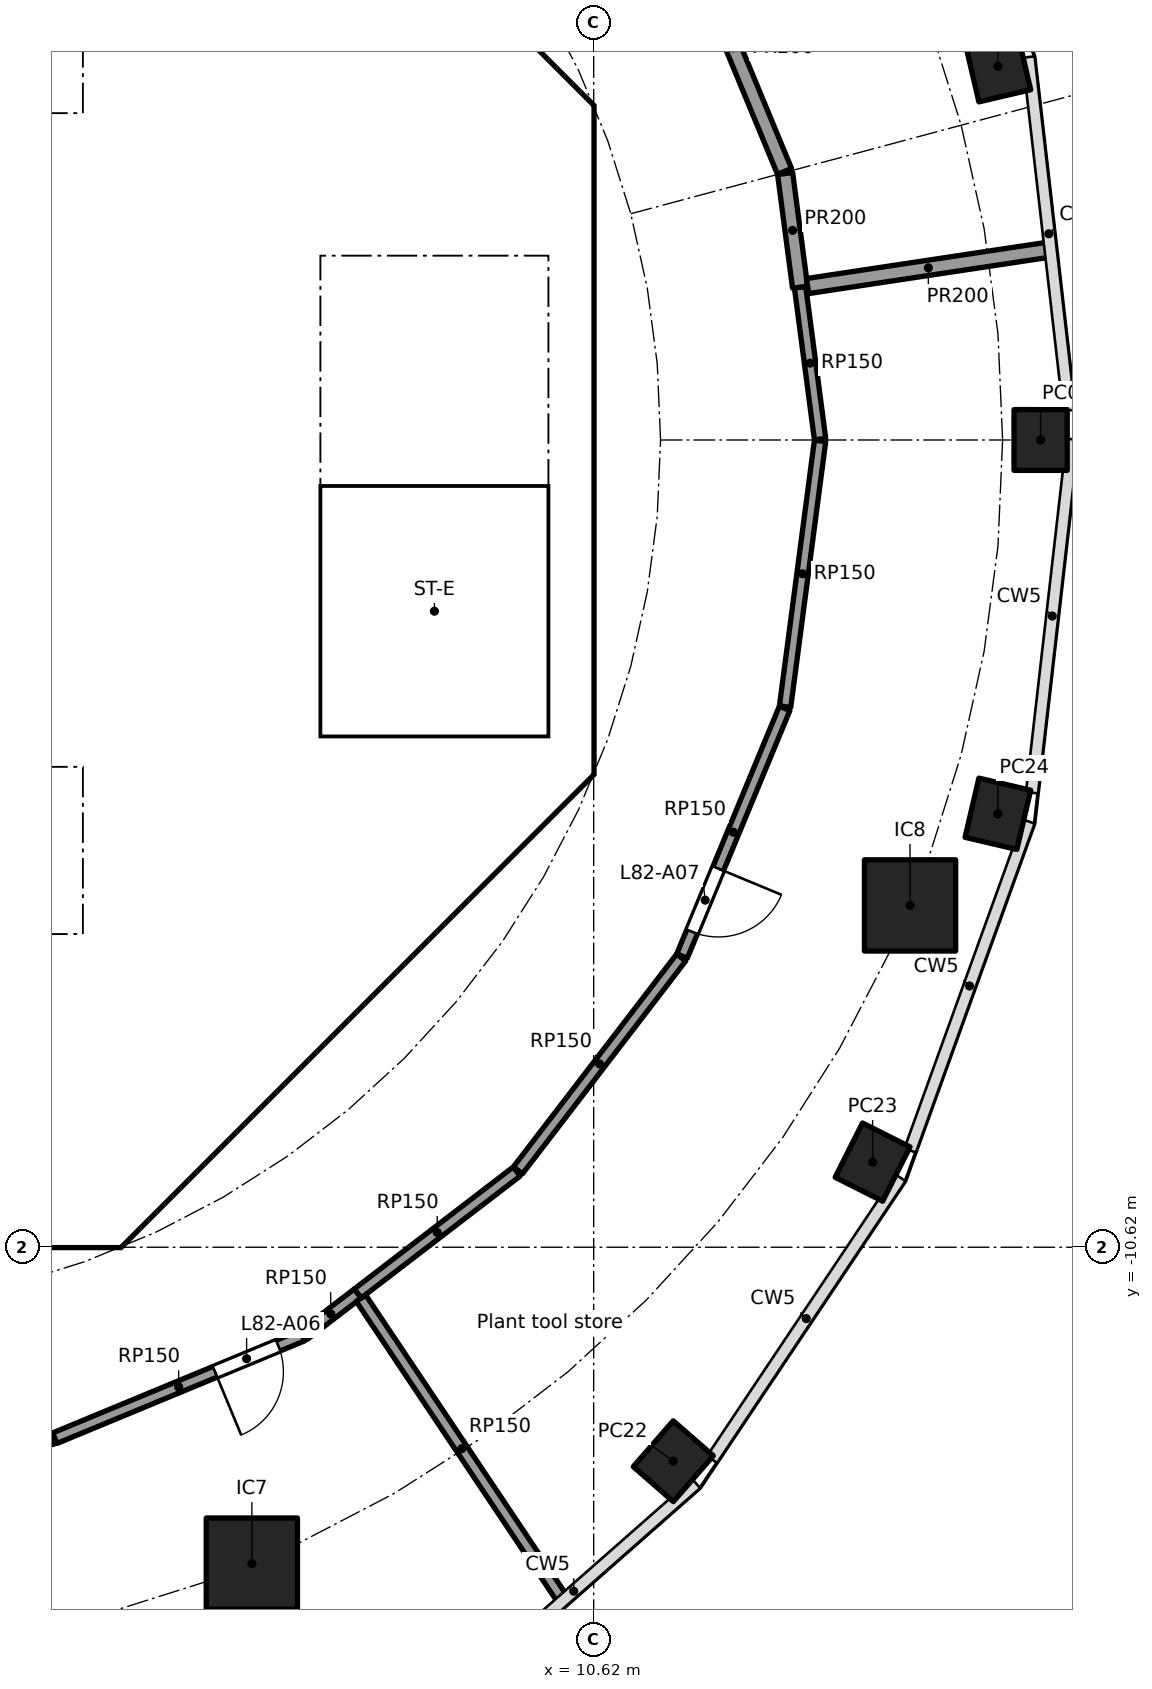
"""IFC4 building model, lengths in metres.
Left out: names, types, materials, properties, quantities, classifications, styles, units other than length and angle.
Written with IfcOpenShell. Run it as: python <this file> out.ifc"""

import sys

from ifc_helpers import new_model, si_unit, direction, frame, frame_2d, origin, origin_2d, place, context, subcontext, project, spatial, polyline, rectangle, hollow_rectangle, outline, extrude, element, fill, save


model = new_model("IFC4")
c1 = context("Model", 3, precision=1e-05, world=origin(), true_north=direction((0.0, 1.0)))
c2 = subcontext(c1, "Body", "Model", "MODEL_VIEW")
j1 = project(units=[si_unit("LENGTHUNIT", "METRE"), si_unit("PLANEANGLEUNIT", "RADIAN")], contexts=[c1])
p1 = place(None, origin())
s1 = spatial("IfcSite", under=j1, at=p1, CompositionType="ELEMENT")
p2 = place(p1, origin())
s2 = spatial("IfcBuilding", under=s1, at=p2, CompositionType="ELEMENT")
p3 = place(p2, frame((0.0, 0.0, 332.9)))
s3 = spatial("IfcBuildingStorey", under=s2, at=p3, CompositionType="ELEMENT", Elevation=332.9)
for number, where, z_axis, x_axis in (
    (1, (16.5, 0.0, 0.0), (0.0, 0.0, 1.0), (0.0, 1.0, 0.0)),
    (2, (15.938, 4.917, 0.0), (0.0, 0.0, 1.0), (-0.227, 0.974, 0.0)),
    (3, (11.667, -13.435, 0.0), (0.0, 0.0, 1.0), (0.657, 0.754, 0.0)),
    (4, (14.289, -9.5, 0.0), (0.0, 0.0, 1.0), (0.45, 0.893, 0.0)),
    (5, (15.938, -4.917, 0.0), (0.0, 0.0, 1.0), (0.227, 0.974, 0.0)),
):
    element("IfcColumn", number, at=place(p3, frame(where, z_axis=z_axis, x_axis=x_axis)), inside=s3, PredefinedType="COLUMN", context=c2, shape_type="SweptSolid", body=[
        extrude(hollow_rectangle(XDim=0.8, YDim=0.7, WallThickness=0.025, at=origin_2d()), origin(), (0.0, 0.0, 1.0), 4.0),
    ])
for number, where, z_axis, x_axis in (
    (6, (6.123, -14.782, 0.0), (0.0, 0.0, 1.0), (1.0, 0.0, 0.0)),
    (7, (14.782, -6.123, 0.0), (0.0, 0.0, 1.0), (1.0, 0.0, 0.0)),
):
    element("IfcColumn", number, at=place(p3, frame(where, z_axis=z_axis, x_axis=x_axis)), inside=s3, PredefinedType="COLUMN", context=c2, shape_type="SweptSolid", body=[
        extrude(rectangle(XDim=1.2, YDim=1.2, at=origin_2d()), origin(), (0.0, 0.0, 1.0), 4.0),
    ])
p4 = place(p3, frame((9.988, 4.613, 0.0), z_axis=(0.0, 0.0, 1.0), x_axis=(-0.707106781187, 0.707106781187, 0.0)))
e8 = element("IfcWall", 8, at=p4, inside=s3, PredefinedType="SHEAR", context=c2, shape_type="SweptSolid", body=[
    extrude(rectangle(XDim=7.602, YDim=0.6, at=frame_2d((3.801, 0.0))), origin(), (0.0, 0.0, 1.0), 3.7),
])
p5 = place(p4, frame((3.201, 0.0, 0.0)))
e9 = element("IfcOpeningElement", 9, at=p5, cuts=e8, PredefinedType="OPENING", context=c2, shape_type="SweptSolid", body=[
    extrude(rectangle(XDim=1.2, YDim=2.1, at=frame_2d((0.6, 1.05))), frame((0.0, 0.31, 0.0), z_axis=(0.0, -1.0, 0.0), x_axis=(1.0, 0.0, 0.0)), (0.0, 0.0, 1.0), 0.62),
])
p6 = place(p3, frame((4.613, -9.988, 0.0), z_axis=(0.0, 0.0, 1.0), x_axis=(0.707106781187, 0.707106781187, 0.0)))
e10 = element("IfcWall", 10, at=p6, inside=s3, PredefinedType="SHEAR", context=c2, shape_type="SweptSolid", body=[
    extrude(rectangle(XDim=7.602, YDim=0.6, at=frame_2d((3.801, 0.0))), origin(), (0.0, 0.0, 1.0), 3.7),
])
p7 = place(p6, frame((3.201, 0.0, 0.0)))
e11 = element("IfcOpeningElement", 11, at=p7, cuts=e10, PredefinedType="OPENING", context=c2, shape_type="SweptSolid", body=[
    extrude(rectangle(XDim=1.2, YDim=2.1, at=frame_2d((0.6, 1.05))), frame((0.0, 0.31, 0.0), z_axis=(0.0, -1.0, 0.0), x_axis=(1.0, 0.0, 0.0)), (0.0, 0.0, 1.0), 0.62),
])
p8 = place(p3, frame((4.0, 4.3, 0.0), z_axis=(0.0, 0.0, 1.0), x_axis=(0.0, 1.0, 0.0)))
e12 = element("IfcWall", 12, at=p8, inside=s3, PredefinedType="SOLIDWALL", context=c2, shape_type="SweptSolid", body=[
    extrude(rectangle(XDim=2.2, YDim=0.2, at=frame_2d((1.1, 0.0))), origin(), (0.0, 0.0, 1.0), 3.7),
])
p9 = place(p8, frame((0.55, 0.0, 0.0)))
e13 = element("IfcOpeningElement", 13, at=p9, cuts=e12, PredefinedType="OPENING", context=c2, shape_type="SweptSolid", body=[
    extrude(rectangle(XDim=1.1, YDim=2.1, at=frame_2d((0.55, 1.05))), frame((0.0, 0.11, 0.0), z_axis=(0.0, -1.0, 0.0), x_axis=(1.0, 0.0, 0.0)), (0.0, 0.0, 1.0), 0.22),
])
p10 = place(p3, frame((-6.7, 2.0, 0.0), z_axis=(0.0, 0.0, 1.0), x_axis=(1.0, 0.0, 0.0)))
e14 = element("IfcWall", 14, at=p10, inside=s3, PredefinedType="SOLIDWALL", context=c2, shape_type="SweptSolid", body=[
    extrude(rectangle(XDim=13.4, YDim=0.2, at=frame_2d((6.7, 0.0))), origin(), (0.0, 0.0, 1.0), 3.7),
])
p11 = place(p10, frame((2.95, 0.0, 0.0)))
e15 = element("IfcOpeningElement", 15, at=p11, cuts=e14, PredefinedType="OPENING", context=c2, shape_type="SweptSolid", body=[
    extrude(rectangle(XDim=0.9, YDim=2.1, at=frame_2d((0.45, 1.05))), frame((0.0, 0.11, 0.0), z_axis=(0.0, -1.0, 0.0), x_axis=(1.0, 0.0, 0.0)), (0.0, 0.0, 1.0), 0.22),
])
p12 = place(p10, frame((8.45, 0.0, 0.0)))
e16 = element("IfcOpeningElement", 16, at=p12, cuts=e14, PredefinedType="OPENING", context=c2, shape_type="SweptSolid", body=[
    extrude(rectangle(XDim=0.9, YDim=2.1, at=frame_2d((0.45, 1.05))), frame((0.0, 0.11, 0.0), z_axis=(0.0, -1.0, 0.0), x_axis=(1.0, 0.0, 0.0)), (0.0, 0.0, 1.0), 0.22),
])
p13 = place(p10, frame((11.75, 0.0, 0.0)))
e17 = element("IfcOpeningElement", 17, at=p13, cuts=e14, PredefinedType="OPENING", context=c2, shape_type="SweptSolid", body=[
    extrude(rectangle(XDim=0.9, YDim=2.1, at=frame_2d((0.45, 1.05))), frame((0.0, 0.11, 0.0), z_axis=(0.0, -1.0, 0.0), x_axis=(1.0, 0.0, 0.0)), (0.0, 0.0, 1.0), 0.22),
])
p14 = place(p3, frame((6.7, 4.0, 0.0), z_axis=(0.0, 0.0, 1.0), x_axis=(1.0, 0.0, 0.0)))
e18 = element("IfcWall", 18, at=p14, inside=s3, PredefinedType="SOLIDWALL", context=c2, shape_type="SweptSolid", body=[
    extrude(rectangle(XDim=3.325, YDim=0.2, at=frame_2d((1.662, 0.0))), origin(), (0.0, 0.0, 1.0), 3.7),
])
p15 = place(p14, frame((1.25, 0.0, 0.0)))
e19 = element("IfcOpeningElement", 19, at=p15, cuts=e18, PredefinedType="OPENING", context=c2, shape_type="SweptSolid", body=[
    extrude(rectangle(XDim=1.1, YDim=2.1, at=frame_2d((0.55, 1.05))), frame((0.0, 0.11, 0.0), z_axis=(0.0, -1.0, 0.0), x_axis=(1.0, 0.0, 0.0)), (0.0, 0.0, 1.0), 0.22),
])
p16 = place(p3, frame((4.0, -10.025, 0.0), z_axis=(0.0, 0.0, 1.0), x_axis=(0.0, 1.0, 0.0)))
e20 = element("IfcWall", 20, at=p16, inside=s3, PredefinedType="SOLIDWALL", context=c2, shape_type="SweptSolid", body=[
    extrude(rectangle(XDim=3.0, YDim=0.2, at=frame_2d((1.5, 0.0))), origin(), (0.0, 0.0, 1.0), 3.7),
])
p17 = place(p16, frame((0.975, 0.0, 0.0)))
e21 = element("IfcOpeningElement", 21, at=p17, cuts=e20, PredefinedType="OPENING", context=c2, shape_type="SweptSolid", body=[
    extrude(rectangle(XDim=1.1, YDim=2.1, at=frame_2d((0.55, 1.05))), frame((0.0, 0.11, 0.0), z_axis=(0.0, -1.0, 0.0), x_axis=(1.0, 0.0, 0.0)), (0.0, 0.0, 1.0), 0.22),
])
p18 = place(p3, frame((4.0, -6.5, 0.0), z_axis=(0.0, 0.0, 1.0), x_axis=(0.0, 1.0, 0.0)))
e22 = element("IfcWall", 22, at=p18, inside=s3, PredefinedType="SOLIDWALL", context=c2, shape_type="SweptSolid", body=[
    extrude(rectangle(XDim=2.2, YDim=0.2, at=frame_2d((1.1, 0.0))), origin(), (0.0, 0.0, 1.0), 3.7),
])
p19 = place(p18, frame((0.55, 0.0, 0.0)))
e23 = element("IfcOpeningElement", 23, at=p19, cuts=e22, PredefinedType="OPENING", context=c2, shape_type="SweptSolid", body=[
    extrude(rectangle(XDim=1.1, YDim=2.1, at=frame_2d((0.55, 1.05))), frame((0.0, 0.11, 0.0), z_axis=(0.0, -1.0, 0.0), x_axis=(1.0, 0.0, 0.0)), (0.0, 0.0, 1.0), 0.22),
])
p20 = place(p3, frame((-6.7, -2.0, 0.0), z_axis=(0.0, 0.0, 1.0), x_axis=(1.0, 0.0, 0.0)))
e24 = element("IfcWall", 24, at=p20, inside=s3, PredefinedType="SOLIDWALL", context=c2, shape_type="SweptSolid", body=[
    extrude(rectangle(XDim=13.4, YDim=0.2, at=frame_2d((6.7, 0.0))), origin(), (0.0, 0.0, 1.0), 3.7),
])
p21 = place(p20, frame((1.85, 0.0, 0.0)))
e25 = element("IfcOpeningElement", 25, at=p21, cuts=e24, PredefinedType="OPENING", context=c2, shape_type="SweptSolid", body=[
    extrude(rectangle(XDim=0.9, YDim=2.1, at=frame_2d((0.45, 1.05))), frame((0.0, 0.11, 0.0), z_axis=(0.0, -1.0, 0.0), x_axis=(1.0, 0.0, 0.0)), (0.0, 0.0, 1.0), 0.22),
])
p22 = place(p20, frame((6.25, 0.0, 0.0)))
e26 = element("IfcOpeningElement", 26, at=p22, cuts=e24, PredefinedType="OPENING", context=c2, shape_type="SweptSolid", body=[
    extrude(rectangle(XDim=0.9, YDim=2.1, at=frame_2d((0.45, 1.05))), frame((0.0, 0.11, 0.0), z_axis=(0.0, -1.0, 0.0), x_axis=(1.0, 0.0, 0.0)), (0.0, 0.0, 1.0), 0.22),
])
p23 = place(p20, frame((10.65, 0.0, 0.0)))
e27 = element("IfcOpeningElement", 27, at=p23, cuts=e24, PredefinedType="OPENING", context=c2, shape_type="SweptSolid", body=[
    extrude(rectangle(XDim=0.9, YDim=2.1, at=frame_2d((0.45, 1.05))), frame((0.0, 0.11, 0.0), z_axis=(0.0, -1.0, 0.0), x_axis=(1.0, 0.0, 0.0)), (0.0, 0.0, 1.0), 0.22),
])
p24 = place(p3, origin())
e28 = element("IfcWall", 28, at=p24, inside=s3, PredefinedType="SHEAR", context=c2, shape_type="SweptSolid", body=[
    extrude(outline(polyline([(-4.152, -10.025), (4.152, -10.025), (4.401, -9.776), (4.825, -10.2), (4.401, -10.625), (-4.401, -10.625), (-4.825, -10.2), (-4.401, -9.776), (-4.152, -10.025)])), origin(), (0.0, 0.0, 1.0), 3.7),
])
p25 = place(p3, origin())
e29 = element("IfcWall", 29, at=p25, inside=s3, PredefinedType="SHEAR", context=c2, shape_type="SweptSolid", body=[
    extrude(outline(polyline([(9.776, -4.401), (10.025, -4.152), (10.025, -3.801), (10.025, 4.152), (9.776, 4.401), (10.2, 4.825), (10.625, 4.401), (10.625, -4.401), (10.2, -4.825), (9.776, -4.401)])), origin(), (0.0, 0.0, 1.0), 3.7),
])
p26 = place(p3, origin())
e30 = element("IfcWall", 30, at=p26, inside=s3, PredefinedType="SOLIDWALL", context=c2, shape_type="SweptSolid", body=[
    extrude(outline(polyline([(-6.7, -2.1), (-6.5, -2.1), (-6.5, -4.1), (-2.3, -4.1), (-2.3, -2.1), (-2.1, -2.1), (-2.1, -4.1), (2.1, -4.1), (2.1, -2.1), (2.3, -2.1), (2.3, -4.1), (6.5, -4.1), (6.5, -2.1), (6.7, -2.1), (6.7, -4.3), (-6.7, -4.3), (-6.7, -2.1)])), origin(), (0.0, 0.0, 1.0), 3.7),
])
p27 = place(p3, origin())
e31 = element("IfcWall", 31, at=p27, inside=s3, PredefinedType="SOLIDWALL", context=c2, shape_type="SweptSolid", body=[
    extrude(outline(polyline([(-6.7, 4.3), (6.7, 4.3), (6.7, 2.1), (6.5, 2.1), (6.5, 4.1), (4.5, 4.1), (4.5, 2.1), (4.3, 2.1), (4.3, 4.1), (0.1, 4.1), (0.1, 2.1), (-0.1, 2.1), (-0.1, 4.1), (-6.5, 4.1), (-6.5, 2.1), (-6.7, 2.1), (-6.7, 4.3)])), origin(), (0.0, 0.0, 1.0), 3.7),
])
p28 = place(p3, origin())
e32 = element("IfcWall", 32, at=p28, inside=s3, PredefinedType="SOLIDWALL", context=c2, shape_type="SweptSolid", body=[
    extrude(outline(polyline([(4.1, -7.025), (-4.1, -7.025), (-4.1, -6.5), (4.1, -6.5), (4.1, -7.025)])), origin(), (0.0, 0.0, 1.0), 3.7),
])
p29 = place(p3, origin())
e33 = element("IfcWall", 33, at=p29, inside=s3, PredefinedType="SOLIDWALL", context=c2, shape_type="SweptSolid", body=[
    extrude(outline(polyline([(7.025, -3.9), (6.7, -3.9), (6.7, 3.9), (7.025, 3.9), (7.025, -3.9)])), origin(), (0.0, 0.0, 1.0), 3.7),
])
p30 = place(p3, origin())
e34 = element("IfcWall", 34, at=p30, inside=s3, PredefinedType="SOLIDWALL", context=c2, shape_type="SweptSolid", body=[
    extrude(outline(polyline([(10.025, -4.1), (6.7, -4.1), (6.7, -3.9), (10.025, -3.9), (10.025, -4.1)])), origin(), (0.0, 0.0, 1.0), 3.7),
])
p31 = place(p3, frame((3.508, -13.138, 0.0), z_axis=(0.0, 0.0, 1.0), x_axis=(-0.991448403586, -0.130499283623, 0.0)))
e35 = element("IfcWall", 35, at=p31, inside=s3, PredefinedType="PARTITIONING", context=c2, shape_type="SweptSolid", body=[
    extrude(rectangle(XDim=3.527, YDim=0.15, at=frame_2d((1.763, 0.0))), origin(), (0.0, 0.0, 1.0), 3.7),
])
p32 = place(p3, frame((6.789, -11.782, 0.0), z_axis=(0.0, 0.0, 1.0), x_axis=(-0.923881838111, -0.382677866108, 0.0)))
e36 = element("IfcWall", 36, at=p32, inside=s3, PredefinedType="PARTITIONING", context=c2, shape_type="SweptSolid", body=[
    extrude(rectangle(XDim=3.527, YDim=0.15, at=frame_2d((1.763, 0.0))), origin(), (0.0, 0.0, 1.0), 3.7),
])
p33 = place(p32, frame((0.346, 0.0, 0.0)))
e37 = element("IfcOpeningElement", 37, at=p33, cuts=e36, PredefinedType="OPENING", context=c2, shape_type="SweptSolid", body=[
    extrude(rectangle(XDim=0.9, YDim=2.1, at=frame_2d((0.45, 1.05))), frame((0.0, 0.085, 0.0), z_axis=(0.0, -1.0, 0.0), x_axis=(1.0, 0.0, 0.0)), (0.0, 0.0, 1.0), 0.17),
])
p34 = place(p3, frame((7.517, -11.228, 0.0), z_axis=(0.0, 0.0, 1.0), x_axis=(-0.79334623579, -0.608770687663, 0.0)))
e38 = element("IfcWall", 38, at=p34, inside=s3, PredefinedType="PARTITIONING", context=c2, shape_type="SweptSolid", body=[
    extrude(rectangle(XDim=0.892, YDim=0.15, at=frame_2d((0.446, 0.0))), origin(), (0.0, 0.0, 1.0), 3.7),
])
p35 = place(p3, frame((7.558, -11.291, 0.0), z_axis=(0.0, 0.0, 1.0), x_axis=(0.55629544905, -0.830984580703, 0.0)))
e39 = element("IfcWall", 39, at=p35, inside=s3, PredefinedType="PARTITIONING", context=c2, shape_type="SweptSolid", body=[
    extrude(rectangle(XDim=4.765, YDim=0.15, at=frame_2d((2.382, 0.0))), origin(), (0.0, 0.0, 1.0), 3.7),
])
p36 = place(p3, frame((9.607, -9.624, 0.0), z_axis=(0.0, 0.0, 1.0), x_axis=(-0.793381127635, -0.608725214126, 0.0)))
e40 = element("IfcWall", 40, at=p36, inside=s3, PredefinedType="PARTITIONING", context=c2, shape_type="SweptSolid", body=[
    extrude(rectangle(XDim=2.635, YDim=0.15, at=frame_2d((1.317, 0.0))), origin(), (0.0, 0.0, 1.0), 3.7),
])
p37 = place(p3, frame((11.771, -6.809, 0.0), z_axis=(0.0, 0.0, 1.0), x_axis=(-0.608736710054, -0.793372307201, 0.0)))
e41 = element("IfcWall", 41, at=p37, inside=s3, PredefinedType="PARTITIONING", context=c2, shape_type="SweptSolid", body=[
    extrude(rectangle(XDim=3.527, YDim=0.15, at=frame_2d((1.763, 0.0))), origin(), (0.0, 0.0, 1.0), 3.7),
])
p38 = place(p3, frame((13.132, -3.531, 0.0), z_axis=(0.0, 0.0, 1.0), x_axis=(-0.382677866108, -0.923881838111, 0.0)))
e42 = element("IfcWall", 42, at=p38, inside=s3, PredefinedType="PARTITIONING", context=c2, shape_type="SweptSolid", body=[
    extrude(rectangle(XDim=3.527, YDim=0.15, at=frame_2d((1.763, 0.0))), origin(), (0.0, 0.0, 1.0), 3.7),
])
p39 = place(p38, frame((2.281, 0.0, 0.0)))
e43 = element("IfcOpeningElement", 43, at=p39, cuts=e42, PredefinedType="OPENING", context=c2, shape_type="SweptSolid", body=[
    extrude(rectangle(XDim=0.9, YDim=2.1, at=frame_2d((0.45, 1.05))), frame((0.0, 0.085, 0.0), z_axis=(0.0, -1.0, 0.0), x_axis=(1.0, 0.0, 0.0)), (0.0, 0.0, 1.0), 0.17),
])
p40 = place(p3, frame((13.335, 2.01, 0.0), z_axis=(0.0, 0.0, 1.0), x_axis=(0.130545357325, -0.991442338051, 0.0)))
e44 = element("IfcWall", 44, at=p40, inside=s3, PredefinedType="PARTITIONING", context=c2, shape_type="SweptSolid", body=[
    extrude(rectangle(XDim=2.016, YDim=0.15, at=frame_2d((1.008, 0.0))), origin(), (0.0, 0.0, 1.0), 3.7),
])
p41 = place(p3, frame((13.598, -0.012, 0.0), z_axis=(0.0, 0.0, 1.0), x_axis=(-0.130499283623, -0.991448403586, 0.0)))
e45 = element("IfcWall", 45, at=p41, inside=s3, PredefinedType="PARTITIONING", context=c2, shape_type="SweptSolid", body=[
    extrude(rectangle(XDim=3.527, YDim=0.15, at=frame_2d((1.763, 0.0))), origin(), (0.0, 0.0, 1.0), 3.7),
])
p42 = place(p3, frame((11.784, 6.786, 0.0), z_axis=(0.0, 0.0, 1.0), x_axis=(0.382723413813, -0.92386297064, 0.0)))
e46 = element("IfcWall", 46, at=p42, inside=s3, PredefinedType="PARTITIONING", context=c2, shape_type="SweptSolid", body=[
    extrude(rectangle(XDim=3.52, YDim=0.2, at=frame_2d((1.76, 0.0))), origin(), (0.0, 0.0, 1.0), 3.7),
])
p43 = place(p42, frame((0.342, 0.0, 0.0)))
e47 = element("IfcOpeningElement", 47, at=p43, cuts=e46, PredefinedType="OPENING", context=c2, shape_type="SweptSolid", body=[
    extrude(rectangle(XDim=0.9, YDim=2.1, at=frame_2d((0.45, 1.05))), frame((0.0, 0.11, 0.0), z_axis=(0.0, -1.0, 0.0), x_axis=(1.0, 0.0, 0.0)), (0.0, 0.0, 1.0), 0.22),
])
p44 = place(p3, frame((13.139, 3.505, 0.0), z_axis=(0.0, 0.0, 1.0), x_axis=(0.130391662061, -0.99146256332, 0.0)))
e48 = element("IfcWall", 48, at=p44, inside=s3, PredefinedType="PARTITIONING", context=c2, shape_type="SweptSolid", body=[
    extrude(rectangle(XDim=1.507, YDim=0.2, at=frame_2d((0.754, 0.0))), origin(), (0.0, 0.0, 1.0), 3.7),
])
p45 = place(p3, frame((13.434, 2.025, 0.0), z_axis=(0.0, 0.0, 1.0), x_axis=(0.988817905908, 0.149127961685, 0.0)))
e49 = element("IfcWall", 49, at=p45, inside=s3, PredefinedType="PARTITIONING", context=c2, shape_type="SweptSolid", body=[
    extrude(rectangle(XDim=3.214, YDim=0.2, at=frame_2d((1.607, 0.0))), origin(), (0.0, 0.0, 1.0), 3.7),
])
p46 = place(p9, origin())
e50 = element("IfcDoor", 50, at=p46, inside=s3, OperationType="DOUBLE_DOOR_SLIDING", PredefinedType="DOOR", context=c2, shape_type="SweptSolid", body=[
    extrude(rectangle(XDim=1.1, YDim=2.1, at=frame_2d((0.55, 1.05))), frame((0.0, 0.025, 0.0), z_axis=(0.0, -1.0, 0.0), x_axis=(1.0, 0.0, 0.0)), (0.0, 0.0, 1.0), 0.05),
])
fill(e13, e50)
p47 = place(p19, origin())
e51 = element("IfcDoor", 51, at=p47, inside=s3, OperationType="DOUBLE_DOOR_SLIDING", PredefinedType="DOOR", context=c2, shape_type="SweptSolid", body=[
    extrude(rectangle(XDim=1.1, YDim=2.1, at=frame_2d((0.55, 1.05))), frame((0.0, 0.025, 0.0), z_axis=(0.0, -1.0, 0.0), x_axis=(1.0, 0.0, 0.0)), (0.0, 0.0, 1.0), 0.05),
])
fill(e23, e51)
p48 = place(p15, frame((1.1, 0.0, 0.0), x_axis=(-1.0, 0.0, 0.0)))
e52 = element("IfcDoor", 52, at=p48, inside=s3, OperationType="SINGLE_SWING_RIGHT", PredefinedType="DOOR", context=c2, shape_type="SweptSolid", body=[
    extrude(rectangle(XDim=1.1, YDim=2.1, at=frame_2d((0.55, 1.05))), frame((0.0, 0.025, 0.0), z_axis=(0.0, -1.0, 0.0), x_axis=(1.0, 0.0, 0.0)), (0.0, 0.0, 1.0), 0.05),
])
fill(e19, e52)
p49 = place(p17, origin())
e53 = element("IfcDoor", 53, at=p49, inside=s3, OperationType="SINGLE_SWING_RIGHT", PredefinedType="DOOR", context=c2, shape_type="SweptSolid", body=[
    extrude(rectangle(XDim=1.1, YDim=2.1, at=frame_2d((0.55, 1.05))), frame((0.0, 0.025, 0.0), z_axis=(0.0, -1.0, 0.0), x_axis=(1.0, 0.0, 0.0)), (0.0, 0.0, 1.0), 0.05),
])
fill(e21, e53)
p50 = place(p13, origin())
e54 = element("IfcDoor", 54, at=p50, inside=s3, OperationType="SINGLE_SWING_RIGHT", PredefinedType="DOOR", context=c2, shape_type="SweptSolid", body=[
    extrude(rectangle(XDim=0.9, YDim=2.1, at=frame_2d((0.45, 1.05))), frame((0.0, 0.025, 0.0), z_axis=(0.0, -1.0, 0.0), x_axis=(1.0, 0.0, 0.0)), (0.0, 0.0, 1.0), 0.05),
])
fill(e17, e54)
p51 = place(p23, frame((0.9, 0.0, 0.0), x_axis=(-1.0, 0.0, 0.0)))
e55 = element("IfcDoor", 55, at=p51, inside=s3, OperationType="SINGLE_SWING_LEFT", PredefinedType="DOOR", context=c2, shape_type="SweptSolid", body=[
    extrude(rectangle(XDim=0.9, YDim=2.1, at=frame_2d((0.45, 1.05))), frame((0.0, 0.025, 0.0), z_axis=(0.0, -1.0, 0.0), x_axis=(1.0, 0.0, 0.0)), (0.0, 0.0, 1.0), 0.05),
])
fill(e27, e55)
p52 = place(p7, origin())
e56 = element("IfcDoor", 56, at=p52, inside=s3, OperationType="SINGLE_SWING_RIGHT", PredefinedType="DOOR", context=c2, shape_type="SweptSolid", body=[
    extrude(rectangle(XDim=1.2, YDim=2.1, at=frame_2d((0.6, 1.05))), frame((0.0, 0.025, 0.0), z_axis=(0.0, -1.0, 0.0), x_axis=(1.0, 0.0, 0.0)), (0.0, 0.0, 1.0), 0.05),
])
fill(e11, e56)
p53 = place(p33, origin())
e57 = element("IfcDoor", 57, at=p53, inside=s3, OperationType="SINGLE_SWING_RIGHT", PredefinedType="DOOR", context=c2, shape_type="SweptSolid", body=[
    extrude(rectangle(XDim=0.9, YDim=2.1, at=frame_2d((0.45, 1.05))), frame((0.0, 0.025, 0.0), z_axis=(0.0, -1.0, 0.0), x_axis=(1.0, 0.0, 0.0)), (0.0, 0.0, 1.0), 0.05),
])
fill(e37, e57)
p54 = place(p39, origin())
e58 = element("IfcDoor", 58, at=p54, inside=s3, OperationType="SINGLE_SWING_LEFT", PredefinedType="DOOR", context=c2, shape_type="SweptSolid", body=[
    extrude(rectangle(XDim=0.9, YDim=2.1, at=frame_2d((0.45, 1.05))), frame((0.0, 0.025, 0.0), z_axis=(0.0, -1.0, 0.0), x_axis=(1.0, 0.0, 0.0)), (0.0, 0.0, 1.0), 0.05),
])
fill(e43, e58)
save(model, sys.argv[1])
